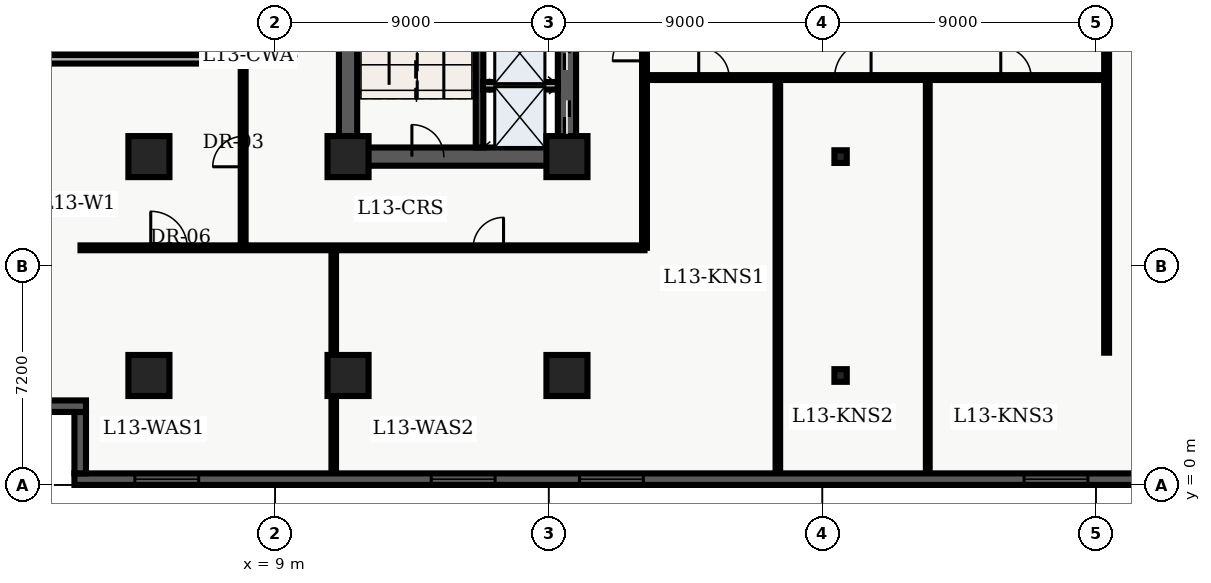
"""IFC4 building model, lengths in metres.
Left out: names, types, materials, properties, quantities, classifications, styles, units other than length and angle.
Written with IfcOpenShell. Run it as: python <this file> out.ifc"""

import sys

from ifc_helpers import new_model, entity, si_unit, converted_unit, direction, frame, origin_with_axes, origin_2d_with_axis, place, context, subcontext, project, spatial, polyline, rectangle, i_section, outline, extrude, element, fill, save


model = new_model("IFC4")
c1 = context("Model", 3, precision=1e-05, world=origin_with_axes(), true_north=direction((0.0, 1.0)))
c2 = subcontext(c1, "Body", "Model", "MODEL_VIEW")
j1 = project(units=[si_unit("LENGTHUNIT", "METRE"), converted_unit("PLANEANGLEUNIT", "DEGREE", entity("IfcPlaneAngleMeasure", 0.017), si_unit("PLANEANGLEUNIT", "RADIAN"), dimensions=[0, 0, 0, 0, 0, 0, 0])], contexts=[c1])
p1 = place(None, origin_with_axes())
s1 = spatial("IfcSite", under=j1, at=p1, CompositionType="ELEMENT")
p2 = place(p1, origin_with_axes())
s2 = spatial("IfcBuilding", under=s1, at=p2, CompositionType="ELEMENT")
p3 = place(p2, frame((0.0, 0.0, 56.1), z_axis=(0.0, 0.0, 1.0), x_axis=(1.0, 0.0, 0.0)))
s3 = spatial("IfcBuildingStorey", under=s2, at=p3, CompositionType="ELEMENT", Elevation=56.1)
p4 = place(p3, frame((11.4, 10.8, 0.0), z_axis=(0.0, 0.0, 1.0), x_axis=(0.0, 1.0, 0.0)))
e1 = element("IfcWall", 1, at=p4, inside=s3, PredefinedType="SHEAR", context=c2, shape_type="SweptSolid", body=[
    extrude(outline(polyline([(0.0, -0.3), (27.0, -0.3), (27.0, 0.3), (0.0, 0.3), (0.0, -0.3)])), origin_with_axes(), (0.0, 0.0, 1.0), 3.66),
])
p5 = place(p3, frame((11.4, 10.8, 0.0), z_axis=(0.0, 0.0, 1.0), x_axis=(1.0, 0.0, 0.0)))
e2 = element("IfcWall", 2, at=p5, inside=s3, PredefinedType="SHEAR", context=c2, shape_type="SweptSolid", body=[
    extrude(outline(polyline([(0.0, -0.3), (7.2, -0.3), (7.2, 0.3), (0.0, 0.3), (0.0, -0.3)])), origin_with_axes(), (0.0, 0.0, 1.0), 3.66),
])
p6 = place(p5, frame((2.625, 0.0, 0.0), z_axis=(0.0, 0.0, 1.0), x_axis=(1.0, 0.0, 0.0)))
e3 = element("IfcOpeningElement", 3, at=p6, cuts=e2, PredefinedType="OPENING", context=c2, shape_type="SweptSolid", body=[
    extrude(rectangle(XDim=1.05, YDim=0.62, at=origin_2d_with_axis()), origin_with_axes(), (0.0, 0.0, 1.0), 2.15),
])
p7 = place(p3, frame((18.6, 10.8, 0.0), z_axis=(0.0, 0.0, 1.0), x_axis=(0.0, 1.0, 0.0)))
e4 = element("IfcWall", 4, at=p7, inside=s3, PredefinedType="SHEAR", context=c2, shape_type="SweptSolid", body=[
    extrude(outline(polyline([(0.0, -0.3), (13.5, -0.3), (13.5, 0.3), (0.0, 0.3), (0.0, -0.3)])), origin_with_axes(), (0.0, 0.0, 1.0), 3.66),
])
p8 = place(p7, frame((1.3, 0.0, 0.0), z_axis=(0.0, 0.0, 1.0), x_axis=(1.0, 0.0, 0.0)))
e5 = element("IfcOpeningElement", 5, at=p8, cuts=e4, PredefinedType="OPENING", context=c2, shape_type="SweptSolid", body=[
    extrude(rectangle(XDim=1.1, YDim=0.62, at=origin_2d_with_axis()), origin_with_axes(), (0.0, 0.0, 1.0), 2.15),
])
p9 = place(p7, frame((3.4, 0.0, 0.0), z_axis=(0.0, 0.0, 1.0), x_axis=(1.0, 0.0, 0.0)))
e6 = element("IfcOpeningElement", 6, at=p9, cuts=e4, PredefinedType="OPENING", context=c2, shape_type="SweptSolid", body=[
    extrude(rectangle(XDim=1.1, YDim=0.62, at=origin_2d_with_axis()), origin_with_axes(), (0.0, 0.0, 1.0), 2.15),
])
p10 = place(p7, frame((11.125, 0.0, 0.0), z_axis=(0.0, 0.0, 1.0), x_axis=(1.0, 0.0, 0.0)))
e7 = element("IfcOpeningElement", 7, at=p10, cuts=e4, PredefinedType="OPENING", context=c2, shape_type="SweptSolid", body=[
    extrude(rectangle(XDim=1.05, YDim=0.62, at=origin_2d_with_axis()), origin_with_axes(), (0.0, 0.0, 1.0), 2.15),
])
p11 = place(p3, frame((15.725, 11.1, 0.0), z_axis=(0.0, 0.0, 1.0), x_axis=(0.0, 1.0, 0.0)))
e8 = element("IfcWall", 8, at=p11, inside=s3, PredefinedType="SHEAR", context=c2, shape_type="SweptSolid", body=[
    extrude(outline(polyline([(0.0, -0.125), (8.6, -0.125), (8.6, 0.125), (0.0, 0.125), (0.0, -0.125)])), origin_with_axes(), (0.0, 0.0, 1.0), 3.66),
])
for number, where, z_axis, x_axis in (
    (9, (11.4, 3.6, 0.0), (0.0, 0.0, 1.0), (1.0, 0.0, 0.0)),
    (10, (11.4, 10.8, 0.0), (0.0, 0.0, 1.0), (1.0, 0.0, 0.0)),
    (11, (18.6, 3.6, 0.0), (0.0, 0.0, 1.0), (1.0, 0.0, 0.0)),
    (12, (18.6, 10.8, 0.0), (0.0, 0.0, 1.0), (1.0, 0.0, 0.0)),
    (13, (4.85, 3.6, 0.0), (0.0, 0.0, 1.0), (1.0, 0.0, 0.0)),
    (14, (4.85, 10.8, 0.0), (0.0, 0.0, 1.0), (1.0, 0.0, 0.0)),
):
    element("IfcColumn", number, at=place(p3, frame(where, z_axis=z_axis, x_axis=x_axis)), inside=s3, PredefinedType="COLUMN", context=c2, shape_type="SweptSolid", body=[
        extrude(rectangle(XDim=1.35, YDim=1.35, at=origin_2d_with_axis()), origin_with_axes(), (0.0, 0.0, 1.0), 3.9),
    ])
for number, where, z_axis, x_axis in (
    (15, (27.6, 3.6, 0.0), (0.0, 0.0, 1.0), (1.0, 0.0, 0.0)),
    (16, (27.6, 10.8, 0.0), (0.0, 0.0, 1.0), (1.0, 0.0, 0.0)),
):
    element("IfcColumn", number, at=place(p3, frame(where, z_axis=z_axis, x_axis=x_axis)), inside=s3, PredefinedType="COLUMN", context=c2, shape_type="SweptSolid", body=[
        extrude(i_section(OverallWidth=0.406, OverallDepth=0.416, WebThickness=0.03, FlangeThickness=0.048, FilletRadius=0.022, at=origin_2d_with_axis()), origin_with_axes(), (0.0, 0.0, 1.0), 3.9),
    ])
p12 = place(p3, frame((15.84, 13.13, 0.0), z_axis=(0.0, 0.0, 1.0), x_axis=(1.0, 0.0, 0.0)))
e17 = element("IfcWall", 17, at=p12, inside=s3, PredefinedType="SOLIDWALL", context=c2, shape_type="SweptSolid", body=[
    extrude(outline(polyline([(0.0, -0.125), (2.46, -0.125), (2.46, 0.125), (0.0, 0.125), (0.0, -0.125)])), origin_with_axes(), (0.0, 0.0, 1.0), 2.7),
])
p13 = place(p3, frame((2.6, 7.8, 0.0), z_axis=(0.0, 0.0, 1.0), x_axis=(1.0, 0.0, 0.0)))
e18 = element("IfcWall", 18, at=p13, inside=s3, PredefinedType="PARTITIONING", context=c2, shape_type="SweptSolid", body=[
    extrude(outline(polyline([(0.0, -0.08), (18.55, -0.08), (18.55, 0.08), (0.0, 0.08), (0.0, -0.08)])), origin_with_axes(), (0.0, 0.0, 1.0), 2.7),
])
p14 = place(p13, frame((2.91, 0.0, 0.0), z_axis=(0.0, 0.0, 1.0), x_axis=(1.0, 0.0, 0.0)))
e19 = element("IfcOpeningElement", 19, at=p14, cuts=e18, PredefinedType="OPENING", context=c2, shape_type="SweptSolid", body=[
    extrude(rectangle(XDim=1.2, YDim=0.18, at=origin_2d_with_axis()), origin_with_axes(), (0.0, 0.0, 1.0), 2.2),
])
p15 = place(p13, frame((13.415, 0.0, 0.0), z_axis=(0.0, 0.0, 1.0), x_axis=(1.0, 0.0, 0.0)))
e20 = element("IfcOpeningElement", 20, at=p15, cuts=e18, PredefinedType="OPENING", context=c2, shape_type="SweptSolid", body=[
    extrude(rectangle(XDim=1.0, YDim=0.18, at=origin_2d_with_axis()), origin_with_axes(), (0.0, 0.0, 1.0), 2.15),
])
p16 = place(p3, frame((21.15, 7.8, 0.0), z_axis=(0.0, 0.0, 1.0), x_axis=(0.0, 1.0, 0.0)))
e21 = element("IfcWall", 21, at=p16, inside=s3, PredefinedType="PARTITIONING", context=c2, shape_type="SweptSolid", body=[
    extrude(outline(polyline([(0.0, -0.08), (32.7, -0.08), (32.7, 0.08), (0.0, 0.08), (0.0, -0.08)])), origin_with_axes(), (0.0, 0.0, 1.0), 2.7),
])
p17 = place(p16, frame((6.675, 0.0, 0.0), z_axis=(0.0, 0.0, 1.0), x_axis=(1.0, 0.0, 0.0)))
e22 = element("IfcOpeningElement", 22, at=p17, cuts=e21, PredefinedType="OPENING", context=c2, shape_type="SweptSolid", body=[
    extrude(rectangle(XDim=1.05, YDim=0.18, at=origin_2d_with_axis()), origin_with_axes(), (0.0, 0.0, 1.0), 2.15),
])
p18 = place(p3, frame((7.95, 7.8, 0.0), z_axis=(0.0, 0.0, 1.0), x_axis=(0.0, 1.0, 0.0)))
e23 = element("IfcWall", 23, at=p18, inside=s3, PredefinedType="PARTITIONING", context=c2, shape_type="SweptSolid", body=[
    extrude(outline(polyline([(0.0, -0.08), (32.7, -0.08), (32.7, 0.08), (0.0, 0.08), (0.0, -0.08)])), origin_with_axes(), (0.0, 0.0, 1.0), 2.7),
])
p19 = place(p18, frame((3.166, 0.0, 0.0), z_axis=(0.0, 0.0, 1.0), x_axis=(1.0, 0.0, 0.0)))
e24 = element("IfcOpeningElement", 24, at=p19, cuts=e23, PredefinedType="OPENING", context=c2, shape_type="SweptSolid", body=[
    extrude(rectangle(XDim=1.0, YDim=0.18, at=origin_2d_with_axis()), origin_with_axes(), (0.0, 0.0, 1.0), 2.15),
])
p20 = place(p18, frame((9.986, 0.0, 0.0), z_axis=(0.0, 0.0, 1.0), x_axis=(1.0, 0.0, 0.0)))
e25 = element("IfcOpeningElement", 25, at=p20, cuts=e23, PredefinedType="OPENING", context=c2, shape_type="SweptSolid", body=[
    extrude(rectangle(XDim=1.0, YDim=0.18, at=origin_2d_with_axis()), origin_with_axes(), (0.0, 0.0, 1.0), 2.15),
])
p21 = place(p18, frame((18.332, 0.0, 0.0), z_axis=(0.0, 0.0, 1.0), x_axis=(1.0, 0.0, 0.0)))
e26 = element("IfcOpeningElement", 26, at=p21, cuts=e23, PredefinedType="OPENING", context=c2, shape_type="SweptSolid", body=[
    extrude(rectangle(XDim=1.0, YDim=0.18, at=origin_2d_with_axis()), origin_with_axes(), (0.0, 0.0, 1.0), 2.15),
])
p22 = place(p18, frame((25.088, 0.0, 0.0), z_axis=(0.0, 0.0, 1.0), x_axis=(1.0, 0.0, 0.0)))
e27 = element("IfcOpeningElement", 27, at=p22, cuts=e23, PredefinedType="OPENING", context=c2, shape_type="SweptSolid", body=[
    extrude(rectangle(XDim=1.0, YDim=0.18, at=origin_2d_with_axis()), origin_with_axes(), (0.0, 0.0, 1.0), 2.15),
])
p23 = place(p18, frame((29.927, 0.0, 0.0), z_axis=(0.0, 0.0, 1.0), x_axis=(1.0, 0.0, 0.0)))
e28 = element("IfcOpeningElement", 28, at=p23, cuts=e23, PredefinedType="OPENING", context=c2, shape_type="SweptSolid", body=[
    extrude(rectangle(XDim=1.0, YDim=0.18, at=origin_2d_with_axis()), origin_with_axes(), (0.0, 0.0, 1.0), 2.15),
])
p24 = place(p3, frame((0.375, 14.001, 0.0), z_axis=(0.0, 0.0, 1.0), x_axis=(1.0, 0.0, 0.0)))
e29 = element("IfcWall", 29, at=p24, inside=s3, PredefinedType="PARTITIONING", context=c2, shape_type="SweptSolid", body=[
    extrude(outline(polyline([(0.0, -0.14), (7.455, -0.14), (7.455, 0.14), (0.0, 0.14), (0.0, -0.14)])), origin_with_axes(), (0.0, 0.0, 1.0), 2.7),
])
p25 = place(p3, frame((10.929, 0.36, 0.0), z_axis=(0.0, 0.0, 1.0), x_axis=(0.0, 1.0, 0.0)))
e30 = element("IfcWall", 30, at=p25, inside=s3, PredefinedType="PARTITIONING", context=c2, shape_type="SweptSolid", body=[
    extrude(outline(polyline([(0.0, -0.075), (7.34, -0.075), (7.34, 0.075), (0.0, 0.075), (0.0, -0.075)])), origin_with_axes(), (0.0, 0.0, 1.0), 2.7),
])
p26 = place(p3, frame((21.15, 13.4, 0.0), z_axis=(0.0, 0.0, 1.0), x_axis=(1.0, 0.0, 0.0)))
e31 = element("IfcWall", 31, at=p26, inside=s3, PredefinedType="PARTITIONING", context=c2, shape_type="SweptSolid", body=[
    extrude(outline(polyline([(0.0, -0.08), (15.2, -0.08), (15.2, 0.08), (0.0, 0.08), (0.0, -0.08)])), origin_with_axes(), (0.0, 0.0, 1.0), 2.7),
])
p27 = place(p26, frame((2.284, 0.0, 0.0), z_axis=(0.0, 0.0, 1.0), x_axis=(1.0, 0.0, 0.0)))
e32 = element("IfcOpeningElement", 32, at=p27, cuts=e31, PredefinedType="OPENING", context=c2, shape_type="SweptSolid", body=[
    extrude(rectangle(XDim=1.0, YDim=0.18, at=origin_2d_with_axis()), origin_with_axes(), (0.0, 0.0, 1.0), 2.15),
])
p28 = place(p26, frame((6.853, 0.0, 0.0), z_axis=(0.0, 0.0, 1.0), x_axis=(1.0, 0.0, 0.0)))
e33 = element("IfcOpeningElement", 33, at=p28, cuts=e31, PredefinedType="OPENING", context=c2, shape_type="SweptSolid", body=[
    extrude(rectangle(XDim=1.2, YDim=0.18, at=origin_2d_with_axis()), origin_with_axes(), (0.0, 0.0, 1.0), 2.2),
])
p29 = place(p26, frame((12.219, 0.0, 0.0), z_axis=(0.0, 0.0, 1.0), x_axis=(1.0, 0.0, 0.0)))
e34 = element("IfcOpeningElement", 34, at=p29, cuts=e31, PredefinedType="OPENING", context=c2, shape_type="SweptSolid", body=[
    extrude(rectangle(XDim=1.0, YDim=0.18, at=origin_2d_with_axis()), origin_with_axes(), (0.0, 0.0, 1.0), 2.15),
])
p30 = place(p3, frame((36.35, 4.35, 0.0), z_axis=(0.0, 0.0, 1.0), x_axis=(0.0, 1.0, 0.0)))
e35 = element("IfcWall", 35, at=p30, inside=s3, PredefinedType="PARTITIONING", context=c2, shape_type="SweptSolid", body=[
    extrude(outline(polyline([(0.0, -0.08), (16.95, -0.08), (16.95, 0.08), (0.0, 0.08), (0.0, -0.08)])), origin_with_axes(), (0.0, 0.0, 1.0), 2.7),
])
p31 = place(p3, frame((25.537, 0.36, 0.0), z_axis=(0.0, 0.0, 1.0), x_axis=(0.0, 1.0, 0.0)))
e36 = element("IfcWall", 36, at=p31, inside=s3, PredefinedType="PARTITIONING", context=c2, shape_type="SweptSolid", body=[
    extrude(outline(polyline([(0.0, -0.075), (12.92, -0.075), (12.92, 0.075), (0.0, 0.075), (0.0, -0.075)])), origin_with_axes(), (0.0, 0.0, 1.0), 2.7),
])
p32 = place(p3, frame((30.468, 0.36, 0.0), z_axis=(0.0, 0.0, 1.0), x_axis=(0.0, 1.0, 0.0)))
e37 = element("IfcWall", 37, at=p32, inside=s3, PredefinedType="PARTITIONING", context=c2, shape_type="SweptSolid", body=[
    extrude(outline(polyline([(0.0, -0.062), (12.92, -0.062), (12.92, 0.062), (0.0, 0.062), (0.0, -0.062)])), origin_with_axes(), (0.0, 0.0, 1.0), 2.7),
])
p33 = place(p3, frame((57.22, 0.19, 0.0), z_axis=(0.0, 0.0, 1.0), x_axis=(-1.0, 0.0, 0.0)))
e38 = element("IfcWall", 38, at=p33, inside=s3, PredefinedType="SOLIDWALL", context=c2, shape_type="SweptSolid", body=[
    extrude(outline(polyline([(0.0, -0.19), (54.82, -0.19), (54.82, 0.19), (0.0, 0.19), (0.0, -0.19)])), origin_with_axes(), (0.0, 0.0, 1.0), 3.66),
])
p34 = place(p33, frame((3.037, 0.0, 0.45), z_axis=(0.0, 0.0, 1.0), x_axis=(1.0, 0.0, 0.0)))
e39 = element("IfcOpeningElement", 39, at=p34, cuts=e38, PredefinedType="OPENING", context=c2, shape_type="SweptSolid", body=[
    extrude(rectangle(XDim=2.1, YDim=0.4, at=origin_2d_with_axis()), origin_with_axes(), (0.0, 0.0, 1.0), 2.2),
])
p35 = place(p33, frame((7.912, 0.0, 0.45), z_axis=(0.0, 0.0, 1.0), x_axis=(1.0, 0.0, 0.0)))
e40 = element("IfcOpeningElement", 40, at=p35, cuts=e38, PredefinedType="OPENING", context=c2, shape_type="SweptSolid", body=[
    extrude(rectangle(XDim=2.1, YDim=0.4, at=origin_2d_with_axis()), origin_with_axes(), (0.0, 0.0, 1.0), 2.2),
])
p36 = place(p33, frame((12.786, 0.0, 0.45), z_axis=(0.0, 0.0, 1.0), x_axis=(1.0, 0.0, 0.0)))
e41 = element("IfcOpeningElement", 41, at=p36, cuts=e38, PredefinedType="OPENING", context=c2, shape_type="SweptSolid", body=[
    extrude(rectangle(XDim=2.1, YDim=0.4, at=origin_2d_with_axis()), origin_with_axes(), (0.0, 0.0, 1.0), 2.2),
])
p37 = place(p33, frame((17.661, 0.0, 0.45), z_axis=(0.0, 0.0, 1.0), x_axis=(1.0, 0.0, 0.0)))
e42 = element("IfcOpeningElement", 42, at=p37, cuts=e38, PredefinedType="OPENING", context=c2, shape_type="SweptSolid", body=[
    extrude(rectangle(XDim=2.1, YDim=0.4, at=origin_2d_with_axis()), origin_with_axes(), (0.0, 0.0, 1.0), 2.2),
])
p38 = place(p33, frame((22.535, 0.0, 0.45), z_axis=(0.0, 0.0, 1.0), x_axis=(1.0, 0.0, 0.0)))
e43 = element("IfcOpeningElement", 43, at=p38, cuts=e38, PredefinedType="OPENING", context=c2, shape_type="SweptSolid", body=[
    extrude(rectangle(XDim=2.1, YDim=0.4, at=origin_2d_with_axis()), origin_with_axes(), (0.0, 0.0, 1.0), 2.2),
])
p39 = place(p33, frame((37.159, 0.0, 0.45), z_axis=(0.0, 0.0, 1.0), x_axis=(1.0, 0.0, 0.0)))
e44 = element("IfcOpeningElement", 44, at=p39, cuts=e38, PredefinedType="OPENING", context=c2, shape_type="SweptSolid", body=[
    extrude(rectangle(XDim=2.1, YDim=0.4, at=origin_2d_with_axis()), origin_with_axes(), (0.0, 0.0, 1.0), 2.2),
])
p40 = place(p33, frame((42.034, 0.0, 0.45), z_axis=(0.0, 0.0, 1.0), x_axis=(1.0, 0.0, 0.0)))
e45 = element("IfcOpeningElement", 45, at=p40, cuts=e38, PredefinedType="OPENING", context=c2, shape_type="SweptSolid", body=[
    extrude(rectangle(XDim=2.1, YDim=0.4, at=origin_2d_with_axis()), origin_with_axes(), (0.0, 0.0, 1.0), 2.2),
])
p41 = place(p33, frame((51.783, 0.0, 0.45), z_axis=(0.0, 0.0, 1.0), x_axis=(1.0, 0.0, 0.0)))
e46 = element("IfcOpeningElement", 46, at=p41, cuts=e38, PredefinedType="OPENING", context=c2, shape_type="SweptSolid", body=[
    extrude(rectangle(XDim=2.1, YDim=0.4, at=origin_2d_with_axis()), origin_with_axes(), (0.0, 0.0, 1.0), 2.2),
])
p42 = place(p3, frame((2.59, 0.38, 0.0), z_axis=(0.0, 0.0, 1.0), x_axis=(0.0, 1.0, 0.0)))
e47 = element("IfcWall", 47, at=p42, inside=s3, PredefinedType="SOLIDWALL", context=c2, shape_type="SweptSolid", body=[
    extrude(outline(polyline([(0.0, -0.19), (2.02, -0.19), (2.02, 0.19), (0.0, 0.19), (0.0, -0.19)])), origin_with_axes(), (0.0, 0.0, 1.0), 3.66),
])
p43 = place(p3, frame((2.78, 2.59, 0.0), z_axis=(0.0, 0.0, 1.0), x_axis=(-1.0, 0.0, 0.0)))
e48 = element("IfcWall", 48, at=p43, inside=s3, PredefinedType="SOLIDWALL", context=c2, shape_type="SweptSolid", body=[
    extrude(outline(polyline([(0.0, -0.19), (2.78, -0.19), (2.78, 0.19), (0.0, 0.19), (0.0, -0.19)])), origin_with_axes(), (0.0, 0.0, 1.0), 3.66),
])
p44 = place(p7, frame((1.3, 0.0, 0.0), z_axis=(0.0, 0.0, 1.0), x_axis=(1.0, 0.0, 0.0)))
e49 = element("IfcDoor", 49, at=p44, inside=s3, OperationType="SLIDING_TO_LEFT", PredefinedType="DOOR", context=c2, shape_type="SweptSolid", body=[
    extrude(rectangle(XDim=1.1, YDim=0.09, at=origin_2d_with_axis()), origin_with_axes(), (0.0, 0.0, 1.0), 2.15),
])
fill(e5, e49)
p45 = place(p7, frame((3.4, 0.0, 0.0), z_axis=(0.0, 0.0, 1.0), x_axis=(1.0, 0.0, 0.0)))
e50 = element("IfcDoor", 50, at=p45, inside=s3, OperationType="SLIDING_TO_RIGHT", PredefinedType="DOOR", context=c2, shape_type="SweptSolid", body=[
    extrude(rectangle(XDim=1.1, YDim=0.09, at=origin_2d_with_axis()), origin_with_axes(), (0.0, 0.0, 1.0), 2.15),
])
fill(e6, e50)
p46 = place(p5, frame((2.625, 0.0, 0.0), z_axis=(0.0, 0.0, 1.0), x_axis=(1.0, 0.0, 0.0)))
e51 = element("IfcDoor", 51, at=p46, inside=s3, OperationType="SINGLE_SWING_LEFT", PredefinedType="DOOR", context=c2, shape_type="SweptSolid", body=[
    extrude(rectangle(XDim=1.05, YDim=0.09, at=origin_2d_with_axis()), origin_with_axes(), (0.0, 0.0, 1.0), 2.15),
])
fill(e3, e51)
p47 = place(p18, frame((3.166, 0.0, 0.0), z_axis=(0.0, 0.0, 1.0), x_axis=(1.0, 0.0, 0.0)))
e52 = element("IfcDoor", 52, at=p47, inside=s3, OperationType="SINGLE_SWING_LEFT", PredefinedType="DOOR", context=c2, shape_type="SweptSolid", body=[
    extrude(rectangle(XDim=1.0, YDim=0.09, at=origin_2d_with_axis()), origin_with_axes(), (0.0, 0.0, 1.0), 2.15),
])
fill(e24, e52)
p48 = place(p13, frame((2.91, 0.0, 0.0), z_axis=(0.0, 0.0, 1.0), x_axis=(1.0, 0.0, 0.0)))
e53 = element("IfcDoor", 53, at=p48, inside=s3, OperationType="SINGLE_SWING_LEFT", PredefinedType="DOOR", context=c2, shape_type="SweptSolid", body=[
    extrude(rectangle(XDim=1.2, YDim=0.09, at=origin_2d_with_axis()), origin_with_axes(), (0.0, 0.0, 1.0), 2.2),
])
fill(e19, e53)
p49 = place(p13, frame((13.415, 0.0, 0.0), z_axis=(0.0, 0.0, 1.0), x_axis=(1.0, 0.0, 0.0)))
e54 = element("IfcDoor", 54, at=p49, inside=s3, OperationType="SINGLE_SWING_RIGHT", PredefinedType="DOOR", context=c2, shape_type="SweptSolid", body=[
    extrude(rectangle(XDim=1.0, YDim=0.09, at=origin_2d_with_axis()), origin_with_axes(), (0.0, 0.0, 1.0), 2.15),
])
fill(e20, e54)
p50 = place(p16, frame((6.675, 0.0, 0.0), z_axis=(0.0, 0.0, 1.0), x_axis=(1.0, 0.0, 0.0)))
e55 = element("IfcDoor", 55, at=p50, inside=s3, OperationType="SINGLE_SWING_LEFT", PredefinedType="DOOR", context=c2, shape_type="SweptSolid", body=[
    extrude(rectangle(XDim=1.05, YDim=0.09, at=origin_2d_with_axis()), origin_with_axes(), (0.0, 0.0, 1.0), 2.15),
])
fill(e22, e55)
p51 = place(p26, frame((2.284, 0.0, 0.0), z_axis=(0.0, 0.0, 1.0), x_axis=(1.0, 0.0, 0.0)))
e56 = element("IfcDoor", 56, at=p51, inside=s3, OperationType="SINGLE_SWING_LEFT", PredefinedType="DOOR", context=c2, shape_type="SweptSolid", body=[
    extrude(rectangle(XDim=1.0, YDim=0.09, at=origin_2d_with_axis()), origin_with_axes(), (0.0, 0.0, 1.0), 2.15),
])
fill(e32, e56)
p52 = place(p26, frame((6.853, 0.0, 0.0), z_axis=(0.0, 0.0, 1.0), x_axis=(1.0, 0.0, 0.0)))
e57 = element("IfcDoor", 57, at=p52, inside=s3, OperationType="SINGLE_SWING_RIGHT", PredefinedType="DOOR", context=c2, shape_type="SweptSolid", body=[
    extrude(rectangle(XDim=1.2, YDim=0.09, at=origin_2d_with_axis()), origin_with_axes(), (0.0, 0.0, 1.0), 2.2),
])
fill(e33, e57)
p53 = place(p26, frame((12.219, 0.0, 0.0), z_axis=(0.0, 0.0, 1.0), x_axis=(1.0, 0.0, 0.0)))
e58 = element("IfcDoor", 58, at=p53, inside=s3, OperationType="SINGLE_SWING_LEFT", PredefinedType="DOOR", context=c2, shape_type="SweptSolid", body=[
    extrude(rectangle(XDim=1.0, YDim=0.09, at=origin_2d_with_axis()), origin_with_axes(), (0.0, 0.0, 1.0), 2.15),
])
fill(e34, e58)
p54 = place(p33, frame((22.535, 0.0, 0.45), z_axis=(0.0, 0.0, 1.0), x_axis=(1.0, 0.0, 0.0)))
e59 = element("IfcWindow", 59, at=p54, inside=s3, PredefinedType="WINDOW", context=c2, shape_type="SweptSolid", body=[
    extrude(rectangle(XDim=2.1, YDim=0.09, at=origin_2d_with_axis()), origin_with_axes(), (0.0, 0.0, 1.0), 2.2),
])
fill(e43, e59)
p55 = place(p33, frame((37.159, 0.0, 0.45), z_axis=(0.0, 0.0, 1.0), x_axis=(1.0, 0.0, 0.0)))
e60 = element("IfcWindow", 60, at=p55, inside=s3, PredefinedType="WINDOW", context=c2, shape_type="SweptSolid", body=[
    extrude(rectangle(XDim=2.1, YDim=0.09, at=origin_2d_with_axis()), origin_with_axes(), (0.0, 0.0, 1.0), 2.2),
])
fill(e44, e60)
p56 = place(p33, frame((42.034, 0.0, 0.45), z_axis=(0.0, 0.0, 1.0), x_axis=(1.0, 0.0, 0.0)))
e61 = element("IfcWindow", 61, at=p56, inside=s3, PredefinedType="WINDOW", context=c2, shape_type="SweptSolid", body=[
    extrude(rectangle(XDim=2.1, YDim=0.09, at=origin_2d_with_axis()), origin_with_axes(), (0.0, 0.0, 1.0), 2.2),
])
fill(e45, e61)
p57 = place(p33, frame((51.783, 0.0, 0.45), z_axis=(0.0, 0.0, 1.0), x_axis=(1.0, 0.0, 0.0)))
e62 = element("IfcWindow", 62, at=p57, inside=s3, PredefinedType="WINDOW", context=c2, shape_type="SweptSolid", body=[
    extrude(rectangle(XDim=2.1, YDim=0.09, at=origin_2d_with_axis()), origin_with_axes(), (0.0, 0.0, 1.0), 2.2),
])
fill(e46, e62)
save(model, sys.argv[1])
